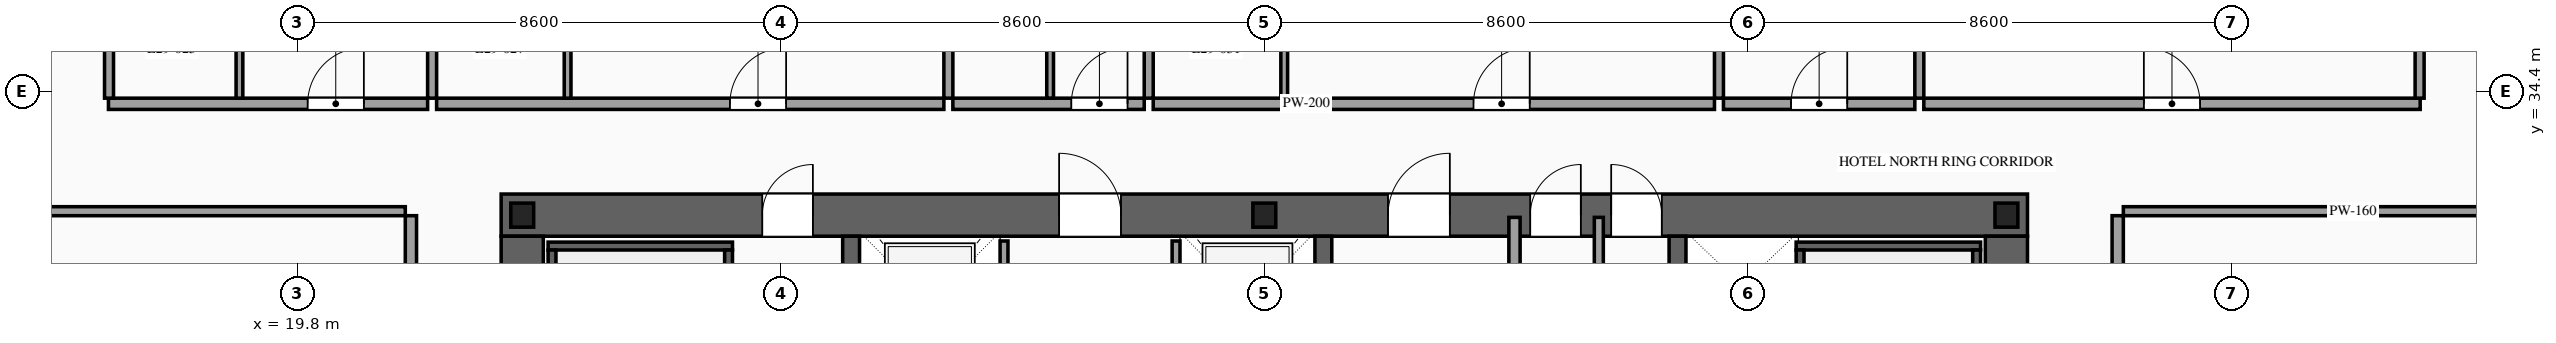
"""IFC4 building model, lengths in metres.
Left out: names, types, materials, properties, quantities, classifications, styles, units other than length and angle.
Written with IfcOpenShell. Run it as: python <this file> out.ifc"""

import sys

from ifc_helpers import new_model, si_unit, direction, frame, frame_2d, origin, origin_2d, place, context, subcontext, project, spatial, rectangle, i_section, extrude, source, transform, mapped, element, fill, save


model = new_model("IFC4")
c1 = context("Model", 3, precision=1e-05, world=origin(), true_north=direction((0.0, 1.0)))
c2 = subcontext(c1, "Body", "Model", "MODEL_VIEW")
j1 = project(units=[si_unit("LENGTHUNIT", "METRE"), si_unit("PLANEANGLEUNIT", "RADIAN")], contexts=[c1])
p1 = place(None, origin())
s1 = spatial("IfcSite", under=j1, at=p1, CompositionType="ELEMENT")
p2 = place(p1, origin())
s2 = spatial("IfcBuilding", under=s1, at=p2, CompositionType="ELEMENT")
p3 = place(p2, frame((0.0, 0.0, 111.8)))
s3 = spatial("IfcBuildingStorey", under=s2, at=p3, CompositionType="ELEMENT", Elevation=111.8)
p4 = place(p3, frame((23.425, 32.2, 0.0), z_axis=(0.0, 0.0, 1.0), x_axis=(1.0, 0.0, 0.0)))
e1 = element("IfcWall", 1, at=p4, inside=s3, PredefinedType="SHEAR", context=c2, shape_type="SweptSolid", body=[
    extrude(rectangle(XDim=27.15, YDim=0.75, at=frame_2d((13.575, 0.0))), origin(), (0.0, 0.0, 1.0), 3.6),
])
p5 = place(p4, frame((4.645, 0.0, 0.0)))
e2 = element("IfcOpeningElement", 2, at=p5, cuts=e1, PredefinedType="OPENING", context=c2, shape_type="SweptSolid", body=[
    extrude(rectangle(XDim=0.9, YDim=2.15, at=frame_2d((0.45, 1.075))), frame((0.0, 0.39, 0.0), z_axis=(0.0, -1.0, 0.0), x_axis=(1.0, 0.0, 0.0)), (0.0, 0.0, 1.0), 0.78),
])
p6 = place(p4, frame((9.925, 0.0, 0.0)))
e3 = element("IfcOpeningElement", 3, at=p6, cuts=e1, PredefinedType="OPENING", context=c2, shape_type="SweptSolid", body=[
    extrude(rectangle(XDim=1.1, YDim=2.2, at=frame_2d((0.55, 1.1))), frame((0.0, 0.39, 0.0), z_axis=(0.0, -1.0, 0.0), x_axis=(1.0, 0.0, 0.0)), (0.0, 0.0, 1.0), 0.78),
])
p7 = place(p4, frame((15.775, 0.0, 0.0)))
e4 = element("IfcOpeningElement", 4, at=p7, cuts=e1, PredefinedType="OPENING", context=c2, shape_type="SweptSolid", body=[
    extrude(rectangle(XDim=1.1, YDim=2.2, at=frame_2d((0.55, 1.1))), frame((0.0, 0.39, 0.0), z_axis=(0.0, -1.0, 0.0), x_axis=(1.0, 0.0, 0.0)), (0.0, 0.0, 1.0), 0.78),
])
p8 = place(p4, frame((18.305, 0.0, 0.0)))
e5 = element("IfcOpeningElement", 5, at=p8, cuts=e1, PredefinedType="OPENING", context=c2, shape_type="SweptSolid", body=[
    extrude(rectangle(XDim=0.9, YDim=2.15, at=frame_2d((0.45, 1.075))), frame((0.0, 0.39, 0.0), z_axis=(0.0, -1.0, 0.0), x_axis=(1.0, 0.0, 0.0)), (0.0, 0.0, 1.0), 0.78),
])
p9 = place(p4, frame((19.745, 0.0, 0.0)))
e6 = element("IfcOpeningElement", 6, at=p9, cuts=e1, PredefinedType="OPENING", context=c2, shape_type="SweptSolid", body=[
    extrude(rectangle(XDim=0.9, YDim=2.15, at=frame_2d((0.45, 1.075))), frame((0.0, 0.39, 0.0), z_axis=(0.0, -1.0, 0.0), x_axis=(1.0, 0.0, 0.0)), (0.0, 0.0, 1.0), 0.78),
])
m1 = source(origin(), c2, "Body", "SweptSolid", [
    extrude(rectangle(XDim=12.05, YDim=0.75, at=frame_2d((6.025, 0.0))), origin(), (0.0, 0.0, 1.0), 3.6),
])
for number, where, z_axis, x_axis in (
    (7, (23.8, 19.775, 0.0), (0.0, 0.0, 1.0), (0.0, 1.0, 0.0)),
    (8, (50.2, 19.775, 0.0), (0.0, 0.0, 1.0), (0.0, 1.0, 0.0)),
):
    element("IfcWall", number, at=place(p3, frame(where, z_axis=z_axis, x_axis=x_axis)), inside=s3, PredefinedType="SHEAR", context=c2, shape_type="MappedRepresentation", body=[
        mapped(m1, transform((0.0, 0.0, 0.0), scale=1.0)),
    ])
m2 = source(origin(), c2, "Body", "SweptSolid", [
    extrude(rectangle(XDim=12.05, YDim=0.3, at=frame_2d((6.025, 0.0))), origin(), (0.0, 0.0, 1.0), 3.6),
])
for number, where, z_axis, x_axis in (
    (9, (29.65, 19.775, 0.0), (0.0, 0.0, 1.0), (0.0, 1.0, 0.0)),
    (10, (38.05, 19.775, 0.0), (0.0, 0.0, 1.0), (0.0, 1.0, 0.0)),
    (11, (44.35, 19.775, 0.0), (0.0, 0.0, 1.0), (0.0, 1.0, 0.0)),
):
    element("IfcWall", number, at=place(p3, frame(where, z_axis=z_axis, x_axis=x_axis)), inside=s3, PredefinedType="SOLIDWALL", context=c2, shape_type="MappedRepresentation", body=[
        mapped(m2, transform((0.0, 0.0, 0.0), scale=1.0)),
    ])
m3 = source(origin(), c2, "Body", "SweptSolid", [
    extrude(i_section(OverallWidth=0.407, OverallDepth=0.428, WebThickness=0.02, FlangeThickness=0.035, at=origin_2d()), origin(), (0.0, 0.0, 1.0), 3.6),
])
for number, where, z_axis, x_axis in (
    (12, (23.8, 32.2, 0.0), (0.0, 0.0, 1.0), (1.0, 0.0, 0.0)),
    (13, (37.0, 32.2, 0.0), (0.0, 0.0, 1.0), (1.0, 0.0, 0.0)),
    (14, (50.2, 32.2, 0.0), (0.0, 0.0, 1.0), (1.0, 0.0, 0.0)),
):
    element("IfcColumn", number, at=place(p3, frame(where, z_axis=z_axis, x_axis=x_axis)), inside=s3, PredefinedType="COLUMN", context=c2, shape_type="MappedRepresentation", body=[
        mapped(m3, transform((0.0, 0.0, 0.0), scale=1.0)),
    ])
p10 = place(p3, frame((32.37, 29.4, 0.0), z_axis=(0.0, 0.0, 1.0), x_axis=(0.0, 1.0, 0.0)))
e15 = element("IfcWall", 15, at=p10, inside=s3, PredefinedType="SOLIDWALL", context=c2, shape_type="SweptSolid", body=[
    extrude(rectangle(XDim=2.34, YDim=0.14, at=frame_2d((1.17, 0.0))), origin(), (0.0, 0.0, 1.0), 3.38),
])
p11 = place(p10, frame((0.62, 0.0, 0.0)))
e16 = element("IfcOpeningElement", 16, at=p11, cuts=e15, PredefinedType="OPENING", context=c2, shape_type="SweptSolid", body=[
    extrude(rectangle(XDim=1.1, YDim=2.2, at=frame_2d((0.55, 1.1))), frame((0.0, 0.085, 0.0), z_axis=(0.0, -1.0, 0.0), x_axis=(1.0, 0.0, 0.0)), (0.0, 0.0, 1.0), 0.17),
])
p12 = place(p3, frame((35.43, 29.4, 0.0), z_axis=(0.0, 0.0, 1.0), x_axis=(0.0, 1.0, 0.0)))
e17 = element("IfcWall", 17, at=p12, inside=s3, PredefinedType="SOLIDWALL", context=c2, shape_type="SweptSolid", body=[
    extrude(rectangle(XDim=2.34, YDim=0.14, at=frame_2d((1.17, 0.0))), origin(), (0.0, 0.0, 1.0), 3.38),
])
p13 = place(p12, frame((0.62, 0.0, 0.0)))
e18 = element("IfcOpeningElement", 18, at=p13, cuts=e17, PredefinedType="OPENING", context=c2, shape_type="SweptSolid", body=[
    extrude(rectangle(XDim=1.1, YDim=2.2, at=frame_2d((0.55, 1.1))), frame((0.0, 0.085, 0.0), z_axis=(0.0, -1.0, 0.0), x_axis=(1.0, 0.0, 0.0)), (0.0, 0.0, 1.0), 0.17),
])
m4 = source(origin(), c2, "Body", "SweptSolid", [
    extrude(rectangle(XDim=3.28, YDim=0.14, at=frame_2d((1.64, 0.0))), origin(), (0.0, 0.0, 1.0), 3.38),
])
p14 = place(p3, frame((24.26, 31.65, 0.0), z_axis=(0.0, 0.0, 1.0), x_axis=(1.0, 0.0, 0.0)))
e19 = element("IfcWall", 19, at=p14, inside=s3, PredefinedType="SOLIDWALL", context=c2, shape_type="MappedRepresentation", body=[
    mapped(m4, transform((0.0, 0.0, 0.0), scale=1.0)),
])
m5 = source(origin(), c2, "Body", "SweptSolid", [
    extrude(rectangle(XDim=8.94, YDim=0.14, at=frame_2d((4.47, 0.0))), origin(), (0.0, 0.0, 1.0), 3.38),
])
for number, where, z_axis, x_axis in (
    (20, (24.33, 22.64, 0.0), (0.0, 0.0, 1.0), (0.0, 1.0, 0.0)),
    (21, (27.47, 22.64, 0.0), (0.0, 0.0, 1.0), (0.0, 1.0, 0.0)),
):
    element("IfcWall", number, at=place(p3, frame(where, z_axis=z_axis, x_axis=x_axis)), inside=s3, PredefinedType="SOLIDWALL", context=c2, shape_type="MappedRepresentation", body=[
        mapped(m5, transform((0.0, 0.0, 0.0), scale=1.0)),
    ])
p15 = place(p3, frame((46.46, 31.65, 0.0), z_axis=(0.0, 0.0, 1.0), x_axis=(1.0, 0.0, 0.0)))
e22 = element("IfcWall", 22, at=p15, inside=s3, PredefinedType="SOLIDWALL", context=c2, shape_type="MappedRepresentation", body=[
    mapped(m4, transform((0.0, 0.0, 0.0), scale=1.0)),
])
for number, where, z_axis, x_axis in (
    (23, (46.53, 22.64, 0.0), (0.0, 0.0, 1.0), (0.0, 1.0, 0.0)),
    (24, (49.67, 22.64, 0.0), (0.0, 0.0, 1.0), (0.0, 1.0, 0.0)),
):
    element("IfcWall", number, at=place(p3, frame(where, z_axis=z_axis, x_axis=x_axis)), inside=s3, PredefinedType="SOLIDWALL", context=c2, shape_type="MappedRepresentation", body=[
        mapped(m5, transform((0.0, 0.0, 0.0), scale=1.0)),
    ])
m6 = source(origin(), c2, "Body", "SweptSolid", [
    extrude(rectangle(XDim=5.96, YDim=0.2, at=frame_2d((2.98, 0.0))), origin(), (0.0, 0.0, 1.0), 3.38),
])
p16 = place(p3, frame((41.45, 26.2, 0.0), z_axis=(0.0, 0.0, 1.0), x_axis=(0.0, 1.0, 0.0)))
e25 = element("IfcWall", 25, at=p16, inside=s3, PredefinedType="PARTITIONING", context=c2, shape_type="MappedRepresentation", body=[
    mapped(m6, transform((0.0, 0.0, 0.0), scale=1.0)),
])
m7 = source(origin(), c2, "Body", "SweptSolid", [
    extrude(rectangle(XDim=5.96, YDim=0.16, at=frame_2d((2.98, 0.0))), origin(), (0.0, 0.0, 1.0), 3.38),
])
p17 = place(p3, frame((42.95, 26.2, 0.0), z_axis=(0.0, 0.0, 1.0), x_axis=(0.0, 1.0, 0.0)))
e26 = element("IfcWall", 26, at=p17, inside=s3, PredefinedType="PARTITIONING", context=c2, shape_type="MappedRepresentation", body=[
    mapped(m7, transform((0.0, 0.0, 0.0), scale=1.0)),
])
p18 = place(p3, frame((16.44, 34.18, 0.0), z_axis=(0.0, 0.0, 1.0), x_axis=(1.0, 0.0, 0.0)))
e27 = element("IfcWall", 27, at=p18, inside=s3, PredefinedType="PARTITIONING", context=c2, shape_type="SweptSolid", body=[
    extrude(rectangle(XDim=5.677, YDim=0.2, at=frame_2d((2.838, 0.0))), origin(), (0.0, 0.0, 1.0), 3.38),
])
p19 = place(p18, frame((3.543, 0.0, 0.0)))
e28 = element("IfcOpeningElement", 28, at=p19, cuts=e27, PredefinedType="OPENING", context=c2, shape_type="SweptSolid", body=[
    extrude(rectangle(XDim=1.0, YDim=2.2, at=frame_2d((0.5, 1.1))), frame((0.0, 0.115, 0.0), z_axis=(0.0, -1.0, 0.0), x_axis=(1.0, 0.0, 0.0)), (0.0, 0.0, 1.0), 0.23),
])
m8 = source(origin(), c2, "Body", "SweptSolid", [
    extrude(rectangle(XDim=14.97, YDim=0.16, at=frame_2d((7.485, 0.0))), origin(), (0.0, 0.0, 1.0), 3.38),
])
p20 = place(p3, frame((22.197, 34.28, 0.0), z_axis=(0.0, 0.0, 1.0), x_axis=(0.0, 1.0, 0.0)))
e29 = element("IfcWall", 29, at=p20, inside=s3, PredefinedType="PARTITIONING", context=c2, shape_type="MappedRepresentation", body=[
    mapped(m8, transform((0.0, 0.0, 0.0), scale=1.0)),
])
m9 = source(origin(), c2, "Body", "SweptSolid", [
    extrude(rectangle(XDim=2.42, YDim=0.12, at=frame_2d((1.21, 0.0))), origin(), (0.0, 0.0, 1.0), 3.38),
])
p21 = place(p3, frame((18.77, 34.28, 0.0), z_axis=(0.0, 0.0, 1.0), x_axis=(0.0, 1.0, 0.0)))
e30 = element("IfcWall", 30, at=p21, inside=s3, PredefinedType="PARTITIONING", context=c2, shape_type="MappedRepresentation", body=[
    mapped(m9, transform((0.0, 0.0, 0.0), scale=1.0)),
])
p22 = place(p3, frame((22.277, 34.18, 0.0), z_axis=(0.0, 0.0, 1.0), x_axis=(1.0, 0.0, 0.0)))
e31 = element("IfcWall", 31, at=p22, inside=s3, PredefinedType="PARTITIONING", context=c2, shape_type="SweptSolid", body=[
    extrude(rectangle(XDim=9.023, YDim=0.2, at=frame_2d((4.511, 0.0))), origin(), (0.0, 0.0, 1.0), 3.38),
])
p23 = place(p22, frame((5.217, 0.0, 0.0)))
e32 = element("IfcOpeningElement", 32, at=p23, cuts=e31, PredefinedType="OPENING", context=c2, shape_type="SweptSolid", body=[
    extrude(rectangle(XDim=1.0, YDim=2.2, at=frame_2d((0.5, 1.1))), frame((0.0, 0.115, 0.0), z_axis=(0.0, -1.0, 0.0), x_axis=(1.0, 0.0, 0.0)), (0.0, 0.0, 1.0), 0.23),
])
p24 = place(p3, frame((31.38, 34.28, 0.0), z_axis=(0.0, 0.0, 1.0), x_axis=(0.0, 1.0, 0.0)))
e33 = element("IfcWall", 33, at=p24, inside=s3, PredefinedType="PARTITIONING", context=c2, shape_type="MappedRepresentation", body=[
    mapped(m8, transform((0.0, 0.0, 0.0), scale=1.0)),
])
p25 = place(p3, frame((24.607, 34.28, 0.0), z_axis=(0.0, 0.0, 1.0), x_axis=(0.0, 1.0, 0.0)))
e34 = element("IfcWall", 34, at=p25, inside=s3, PredefinedType="PARTITIONING", context=c2, shape_type="MappedRepresentation", body=[
    mapped(m9, transform((0.0, 0.0, 0.0), scale=1.0)),
])
p26 = place(p3, frame((31.46, 34.18, 0.0), z_axis=(0.0, 0.0, 1.0), x_axis=(1.0, 0.0, 0.0)))
e35 = element("IfcWall", 35, at=p26, inside=s3, PredefinedType="PARTITIONING", context=c2, shape_type="SweptSolid", body=[
    extrude(rectangle(XDim=3.404, YDim=0.2, at=frame_2d((1.702, 0.0))), origin(), (0.0, 0.0, 1.0), 3.38),
])
p27 = place(p26, frame((2.107, 0.0, 0.0)))
e36 = element("IfcOpeningElement", 36, at=p27, cuts=e35, PredefinedType="OPENING", context=c2, shape_type="SweptSolid", body=[
    extrude(rectangle(XDim=1.0, YDim=2.2, at=frame_2d((0.5, 1.1))), frame((0.0, 0.115, 0.0), z_axis=(0.0, -1.0, 0.0), x_axis=(1.0, 0.0, 0.0)), (0.0, 0.0, 1.0), 0.23),
])
p28 = place(p3, frame((34.944, 34.28, 0.0), z_axis=(0.0, 0.0, 1.0), x_axis=(0.0, 1.0, 0.0)))
e37 = element("IfcWall", 37, at=p28, inside=s3, PredefinedType="PARTITIONING", context=c2, shape_type="MappedRepresentation", body=[
    mapped(m8, transform((0.0, 0.0, 0.0), scale=1.0)),
])
p29 = place(p3, frame((33.19, 34.28, 0.0), z_axis=(0.0, 0.0, 1.0), x_axis=(0.0, 1.0, 0.0)))
e38 = element("IfcWall", 38, at=p29, inside=s3, PredefinedType="PARTITIONING", context=c2, shape_type="MappedRepresentation", body=[
    mapped(m9, transform((0.0, 0.0, 0.0), scale=1.0)),
])
p30 = place(p3, frame((35.024, 34.18, 0.0), z_axis=(0.0, 0.0, 1.0), x_axis=(1.0, 0.0, 0.0)))
e39 = element("IfcWall", 39, at=p30, inside=s3, PredefinedType="PARTITIONING", context=c2, shape_type="SweptSolid", body=[
    extrude(rectangle(XDim=9.983, YDim=0.2, at=frame_2d((4.992, 0.0))), origin(), (0.0, 0.0, 1.0), 3.38),
])
p31 = place(p30, frame((5.697, 0.0, 0.0)))
e40 = element("IfcOpeningElement", 40, at=p31, cuts=e39, PredefinedType="OPENING", context=c2, shape_type="SweptSolid", body=[
    extrude(rectangle(XDim=1.0, YDim=2.2, at=frame_2d((0.5, 1.1))), frame((0.0, 0.115, 0.0), z_axis=(0.0, -1.0, 0.0), x_axis=(1.0, 0.0, 0.0)), (0.0, 0.0, 1.0), 0.23),
])
p32 = place(p3, frame((45.087, 34.28, 0.0), z_axis=(0.0, 0.0, 1.0), x_axis=(0.0, 1.0, 0.0)))
e41 = element("IfcWall", 41, at=p32, inside=s3, PredefinedType="PARTITIONING", context=c2, shape_type="MappedRepresentation", body=[
    mapped(m8, transform((0.0, 0.0, 0.0), scale=1.0)),
])
p33 = place(p3, frame((37.354, 34.28, 0.0), z_axis=(0.0, 0.0, 1.0), x_axis=(0.0, 1.0, 0.0)))
e42 = element("IfcWall", 42, at=p33, inside=s3, PredefinedType="PARTITIONING", context=c2, shape_type="MappedRepresentation", body=[
    mapped(m9, transform((0.0, 0.0, 0.0), scale=1.0)),
])
p34 = place(p3, frame((45.167, 34.18, 0.0), z_axis=(0.0, 0.0, 1.0), x_axis=(1.0, 0.0, 0.0)))
e43 = element("IfcWall", 43, at=p34, inside=s3, PredefinedType="PARTITIONING", context=c2, shape_type="SweptSolid", body=[
    extrude(rectangle(XDim=3.404, YDim=0.2, at=frame_2d((1.702, 0.0))), origin(), (0.0, 0.0, 1.0), 3.38),
])
p35 = place(p34, frame((1.202, 0.0, 0.0)))
e44 = element("IfcOpeningElement", 44, at=p35, cuts=e43, PredefinedType="OPENING", context=c2, shape_type="SweptSolid", body=[
    extrude(rectangle(XDim=1.0, YDim=2.2, at=frame_2d((0.5, 1.1))), frame((0.0, 0.115, 0.0), z_axis=(0.0, -1.0, 0.0), x_axis=(1.0, 0.0, 0.0)), (0.0, 0.0, 1.0), 0.23),
])
p36 = place(p3, frame((48.651, 34.28, 0.0), z_axis=(0.0, 0.0, 1.0), x_axis=(0.0, 1.0, 0.0)))
e45 = element("IfcWall", 45, at=p36, inside=s3, PredefinedType="PARTITIONING", context=c2, shape_type="MappedRepresentation", body=[
    mapped(m8, transform((0.0, 0.0, 0.0), scale=1.0)),
])
p37 = place(p3, frame((48.731, 34.18, 0.0), z_axis=(0.0, 0.0, 1.0), x_axis=(1.0, 0.0, 0.0)))
e46 = element("IfcWall", 46, at=p37, inside=s3, PredefinedType="PARTITIONING", context=c2, shape_type="SweptSolid", body=[
    extrude(rectangle(XDim=8.829, YDim=0.2, at=frame_2d((4.415, 0.0))), origin(), (0.0, 0.0, 1.0), 3.38),
])
p38 = place(p37, frame((3.914, 0.0, 0.0)))
e47 = element("IfcOpeningElement", 47, at=p38, cuts=e46, PredefinedType="OPENING", context=c2, shape_type="SweptSolid", body=[
    extrude(rectangle(XDim=1.0, YDim=2.2, at=frame_2d((0.5, 1.1))), frame((0.0, 0.115, 0.0), z_axis=(0.0, -1.0, 0.0), x_axis=(1.0, 0.0, 0.0)), (0.0, 0.0, 1.0), 0.23),
])
m10 = source(origin(), c2, "Body", "SweptSolid", [
    extrude(rectangle(XDim=14.82, YDim=0.16, at=frame_2d((7.41, 0.0))), origin(), (0.0, 0.0, 1.0), 3.38),
])
for number, where, z_axis, x_axis in (
    (48, (16.45, 34.28, 0.0), (0.0, 0.0, 1.0), (0.0, 1.0, 0.0)),
    (49, (57.55, 34.28, 0.0), (0.0, 0.0, 1.0), (0.0, 1.0, 0.0)),
):
    element("IfcWall", number, at=place(p3, frame(where, z_axis=z_axis, x_axis=x_axis)), inside=s3, PredefinedType="PARTITIONING", context=c2, shape_type="MappedRepresentation", body=[
        mapped(m10, transform((0.0, 0.0, 0.0), scale=1.0)),
    ])
p39 = place(p3, frame((21.82, 19.41, 0.0), z_axis=(0.0, 0.0, 1.0), x_axis=(0.0, 1.0, 0.0)))
e50 = element("IfcWall", 50, at=p39, inside=s3, PredefinedType="PARTITIONING", context=c2, shape_type="SweptSolid", body=[
    extrude(rectangle(XDim=12.78, YDim=0.2, at=frame_2d((6.39, 0.0))), origin(), (0.0, 0.0, 1.0), 3.38),
])
p40 = place(p39, frame((5.89, 0.0, 0.0)))
e51 = element("IfcOpeningElement", 51, at=p40, cuts=e50, PredefinedType="OPENING", context=c2, shape_type="SweptSolid", body=[
    extrude(rectangle(XDim=1.0, YDim=2.2, at=frame_2d((0.5, 1.1))), frame((0.0, 0.115, 0.0), z_axis=(0.0, -1.0, 0.0), x_axis=(1.0, 0.0, 0.0)), (0.0, 0.0, 1.0), 0.23),
])
m11 = source(origin(), c2, "Body", "SweptSolid", [
    extrude(rectangle(XDim=8.17, YDim=0.16, at=frame_2d((4.085, 0.0))), origin(), (0.0, 0.0, 1.0), 2.875),
])
p41 = place(p3, frame((13.55, 32.27, 0.0), z_axis=(0.0, 0.0, 1.0), x_axis=(1.0, 0.0, 0.0)))
e52 = element("IfcWall", 52, at=p41, inside=s3, PredefinedType="PARTITIONING", context=c2, shape_type="MappedRepresentation", body=[
    mapped(m11, transform((0.0, 0.0, 0.0), scale=1.0)),
])
p42 = place(p3, frame((52.18, 25.88, 0.0), z_axis=(0.0, 0.0, 1.0), x_axis=(0.0, 1.0, 0.0)))
e53 = element("IfcWall", 53, at=p42, inside=s3, PredefinedType="PARTITIONING", context=c2, shape_type="SweptSolid", body=[
    extrude(rectangle(XDim=6.31, YDim=0.2, at=frame_2d((3.155, 0.0))), origin(), (0.0, 0.0, 1.0), 3.38),
])
p43 = place(p42, frame((3.835, 0.0, 0.0)))
e54 = element("IfcOpeningElement", 54, at=p43, cuts=e53, PredefinedType="OPENING", context=c2, shape_type="SweptSolid", body=[
    extrude(rectangle(XDim=1.0, YDim=2.2, at=frame_2d((0.5, 1.1))), frame((0.0, 0.115, 0.0), z_axis=(0.0, -1.0, 0.0), x_axis=(1.0, 0.0, 0.0)), (0.0, 0.0, 1.0), 0.23),
])
p44 = place(p3, frame((52.28, 32.27, 0.0), z_axis=(0.0, 0.0, 1.0), x_axis=(1.0, 0.0, 0.0)))
e55 = element("IfcWall", 55, at=p44, inside=s3, PredefinedType="PARTITIONING", context=c2, shape_type="MappedRepresentation", body=[
    mapped(m11, transform((0.0, 0.0, 0.0), scale=1.0)),
])
m12 = source(origin(), c2, "Body", "SweptSolid", [
    extrude(rectangle(XDim=0.9, YDim=2.15, at=frame_2d((0.45, 1.075))), frame((0.0, 0.025, 0.0), z_axis=(0.0, -1.0, 0.0), x_axis=(1.0, 0.0, 0.0)), (0.0, 0.0, 1.0), 0.05),
])
p45 = place(p5, origin())
e56 = element("IfcDoor", 56, at=p45, inside=s3, OperationType="SINGLE_SWING_RIGHT", PredefinedType="DOOR", context=c2, shape_type="MappedRepresentation", body=[
    mapped(m12, transform((0.0, 0.0, 0.0), scale=1.0)),
])
fill(e2, e56)
m13 = source(origin(), c2, "Body", "SweptSolid", [
    extrude(rectangle(XDim=1.1, YDim=2.2, at=frame_2d((0.55, 1.1))), frame((0.0, 0.025, 0.0), z_axis=(0.0, -1.0, 0.0), x_axis=(1.0, 0.0, 0.0)), (0.0, 0.0, 1.0), 0.05),
])
p46 = place(p6, origin())
e57 = element("IfcDoor", 57, at=p46, inside=s3, OperationType="SINGLE_SWING_LEFT", PredefinedType="DOOR", context=c2, shape_type="MappedRepresentation", body=[
    mapped(m13, transform((0.0, 0.0, 0.0), scale=1.0)),
])
fill(e3, e57)
p47 = place(p7, origin())
e58 = element("IfcDoor", 58, at=p47, inside=s3, OperationType="SINGLE_SWING_RIGHT", PredefinedType="DOOR", context=c2, shape_type="MappedRepresentation", body=[
    mapped(m13, transform((0.0, 0.0, 0.0), scale=1.0)),
])
fill(e4, e58)
p48 = place(p8, origin())
e59 = element("IfcDoor", 59, at=p48, inside=s3, OperationType="SINGLE_SWING_RIGHT", PredefinedType="DOOR", context=c2, shape_type="MappedRepresentation", body=[
    mapped(m12, transform((0.0, 0.0, 0.0), scale=1.0)),
])
fill(e5, e59)
p49 = place(p9, origin())
e60 = element("IfcDoor", 60, at=p49, inside=s3, OperationType="SINGLE_SWING_LEFT", PredefinedType="DOOR", context=c2, shape_type="MappedRepresentation", body=[
    mapped(m12, transform((0.0, 0.0, 0.0), scale=1.0)),
])
fill(e6, e60)
m14 = source(origin(), c2, "Body", "SweptSolid", [
    extrude(rectangle(XDim=1.0, YDim=2.2, at=frame_2d((0.5, 1.1))), frame((0.0, 0.025, 0.0), z_axis=(0.0, -1.0, 0.0), x_axis=(1.0, 0.0, 0.0)), (0.0, 0.0, 1.0), 0.05),
])
p50 = place(p19, origin())
e61 = element("IfcDoor", 61, at=p50, inside=s3, OperationType="SINGLE_SWING_RIGHT", PredefinedType="DOOR", context=c2, shape_type="MappedRepresentation", body=[
    mapped(m14, transform((0.0, 0.0, 0.0), scale=1.0)),
])
fill(e28, e61)
p51 = place(p23, origin())
e62 = element("IfcDoor", 62, at=p51, inside=s3, OperationType="SINGLE_SWING_RIGHT", PredefinedType="DOOR", context=c2, shape_type="MappedRepresentation", body=[
    mapped(m14, transform((0.0, 0.0, 0.0), scale=1.0)),
])
fill(e32, e62)
p52 = place(p27, origin())
e63 = element("IfcDoor", 63, at=p52, inside=s3, OperationType="SINGLE_SWING_RIGHT", PredefinedType="DOOR", context=c2, shape_type="MappedRepresentation", body=[
    mapped(m14, transform((0.0, 0.0, 0.0), scale=1.0)),
])
fill(e36, e63)
p53 = place(p31, origin())
e64 = element("IfcDoor", 64, at=p53, inside=s3, OperationType="SINGLE_SWING_RIGHT", PredefinedType="DOOR", context=c2, shape_type="MappedRepresentation", body=[
    mapped(m14, transform((0.0, 0.0, 0.0), scale=1.0)),
])
fill(e40, e64)
p54 = place(p35, origin())
e65 = element("IfcDoor", 65, at=p54, inside=s3, OperationType="SINGLE_SWING_RIGHT", PredefinedType="DOOR", context=c2, shape_type="MappedRepresentation", body=[
    mapped(m14, transform((0.0, 0.0, 0.0), scale=1.0)),
])
fill(e44, e65)
p55 = place(p38, origin())
e66 = element("IfcDoor", 66, at=p55, inside=s3, OperationType="SINGLE_SWING_LEFT", PredefinedType="DOOR", context=c2, shape_type="MappedRepresentation", body=[
    mapped(m14, transform((0.0, 0.0, 0.0), scale=1.0)),
])
fill(e47, e66)
save(model, sys.argv[1])
